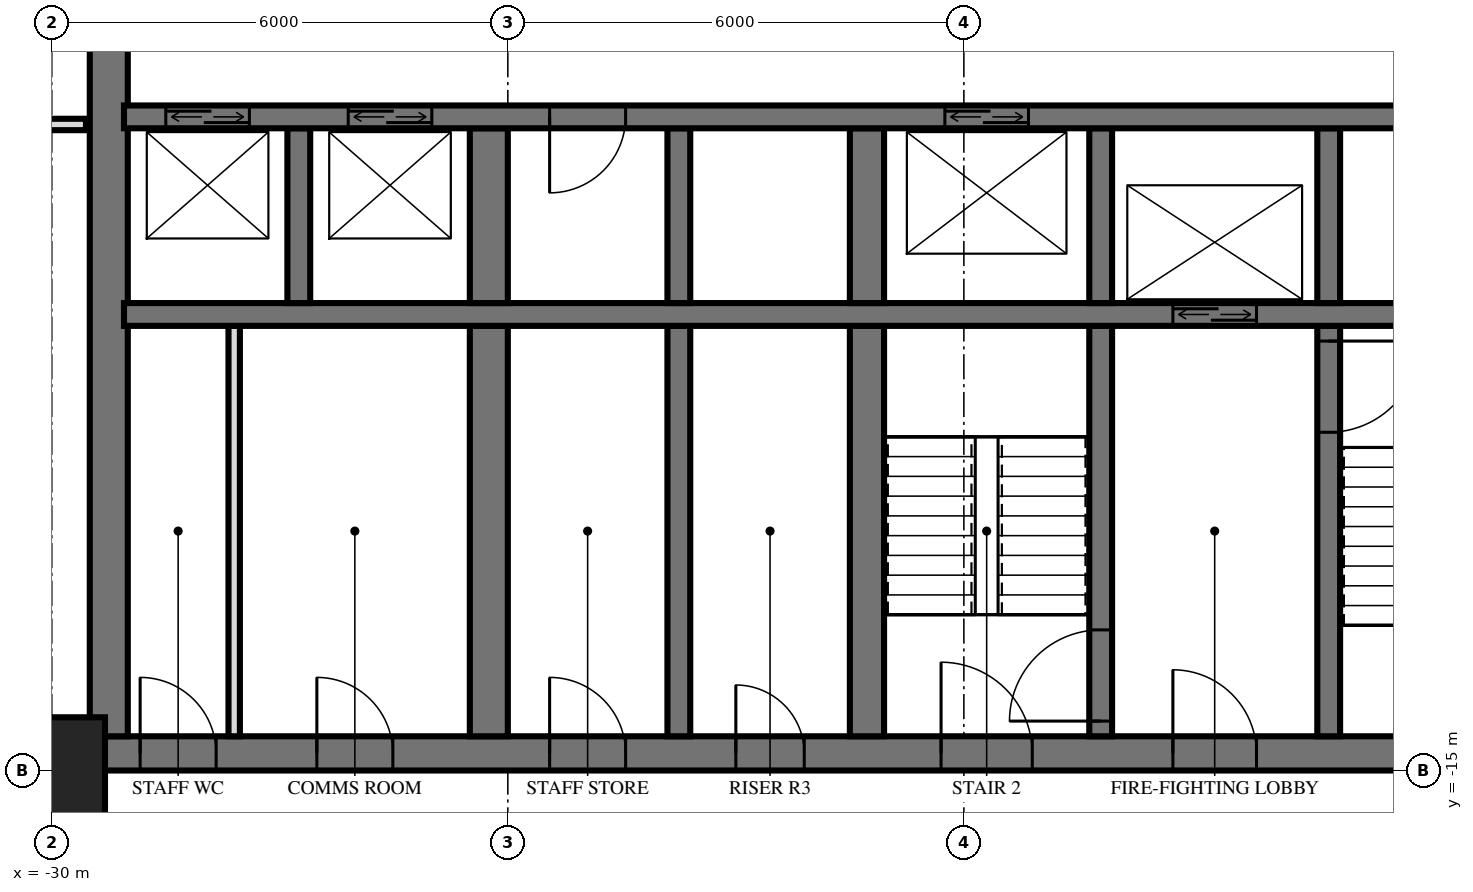
"""IFC4 building model, lengths in metres.
Left out: names, types, materials, properties, quantities, classifications, styles, units other than length and angle.
Written with IfcOpenShell. Run it as: python <this file> out.ifc"""

import sys

from ifc_helpers import new_model, si_unit, direction, frame, frame_2d, origin, origin_2d, place, context, subcontext, project, spatial, rectangle, extrude, element, fill, save


model = new_model("IFC4")
c1 = context("Model", 3, precision=1e-05, world=origin(), true_north=direction((0.0, 1.0)))
c2 = subcontext(c1, "Body", "Model", "MODEL_VIEW")
j1 = project(units=[si_unit("LENGTHUNIT", "METRE"), si_unit("PLANEANGLEUNIT", "RADIAN")], contexts=[c1])
p1 = place(None, origin())
s1 = spatial("IfcSite", under=j1, at=p1, CompositionType="ELEMENT")
p2 = place(p1, origin())
s2 = spatial("IfcBuilding", under=s1, at=p2, CompositionType="ELEMENT")
p3 = place(p2, frame((0.0, 0.0, 74.4)))
s3 = spatial("IfcBuildingStorey", under=s2, at=p3, CompositionType="ELEMENT", Elevation=74.4)
p4 = place(p3, frame((-30.0, -15.0, 0.0), z_axis=(0.0, 0.0, 1.0), x_axis=(1.0, 0.0, 0.0)))
e1 = element("IfcColumn", 1, at=p4, inside=s3, PredefinedType="COLUMN", context=c2, shape_type="SweptSolid", body=[
    extrude(rectangle(XDim=1.4, YDim=1.4, at=origin_2d()), origin(), (0.0, 0.0, 1.0), 3.6),
])
p5 = place(p3, frame((-29.5, -14.775, 0.0), z_axis=(0.0, 0.0, 1.0), x_axis=(1.0, 0.0, 0.0)))
e2 = element("IfcWall", 2, at=p5, inside=s3, PredefinedType="SHEAR", context=c2, shape_type="SweptSolid", body=[
    extrude(rectangle(XDim=19.5, YDim=0.45, at=frame_2d((9.75, 0.0))), origin(), (0.0, 0.0, 1.0), 3.6),
])
p6 = place(p5, frame((11.2, 0.0, 0.0)))
e3 = element("IfcOpeningElement", 3, at=p6, cuts=e2, PredefinedType="OPENING", context=c2, shape_type="SweptSolid", body=[
    extrude(rectangle(XDim=1.2, YDim=2.1, at=frame_2d((0.6, 1.05))), frame((0.0, 0.235, 0.0), z_axis=(0.0, -1.0, 0.0), x_axis=(1.0, 0.0, 0.0)), (0.0, 0.0, 1.0), 0.47),
])
p7 = place(p5, frame((14.25, 0.0, 0.0)))
e4 = element("IfcOpeningElement", 4, at=p7, cuts=e2, PredefinedType="OPENING", context=c2, shape_type="SweptSolid", body=[
    extrude(rectangle(XDim=1.1, YDim=2.1, at=frame_2d((0.55, 1.05))), frame((0.0, 0.235, 0.0), z_axis=(0.0, -1.0, 0.0), x_axis=(1.0, 0.0, 0.0)), (0.0, 0.0, 1.0), 0.47),
])
p8 = place(p5, frame((8.5, 0.0, 0.0)))
e5 = element("IfcOpeningElement", 5, at=p8, cuts=e2, PredefinedType="OPENING", context=c2, shape_type="SweptSolid", body=[
    extrude(rectangle(XDim=0.9, YDim=2.1, at=frame_2d((0.45, 1.05))), frame((0.0, 0.235, 0.0), z_axis=(0.0, -1.0, 0.0), x_axis=(1.0, 0.0, 0.0)), (0.0, 0.0, 1.0), 0.47),
])
p9 = place(p5, frame((6.05, 0.0, 0.0)))
e6 = element("IfcOpeningElement", 6, at=p9, cuts=e2, PredefinedType="OPENING", context=c2, shape_type="SweptSolid", body=[
    extrude(rectangle(XDim=1.0, YDim=2.1, at=frame_2d((0.5, 1.05))), frame((0.0, 0.235, 0.0), z_axis=(0.0, -1.0, 0.0), x_axis=(1.0, 0.0, 0.0)), (0.0, 0.0, 1.0), 0.47),
])
p10 = place(p5, frame((2.988, 0.0, 0.0)))
e7 = element("IfcOpeningElement", 7, at=p10, cuts=e2, PredefinedType="OPENING", context=c2, shape_type="SweptSolid", body=[
    extrude(rectangle(XDim=1.0, YDim=2.1, at=frame_2d((0.5, 1.05))), frame((0.0, 0.235, 0.0), z_axis=(0.0, -1.0, 0.0), x_axis=(1.0, 0.0, 0.0)), (0.0, 0.0, 1.0), 0.47),
])
p11 = place(p5, frame((0.663, 0.0, 0.0)))
e8 = element("IfcOpeningElement", 8, at=p11, cuts=e2, PredefinedType="OPENING", context=c2, shape_type="SweptSolid", body=[
    extrude(rectangle(XDim=1.0, YDim=2.1, at=frame_2d((0.5, 1.05))), frame((0.0, 0.235, 0.0), z_axis=(0.0, -1.0, 0.0), x_axis=(1.0, 0.0, 0.0)), (0.0, 0.0, 1.0), 0.47),
])
p12 = place(p3, frame((-29.25, -14.55, 0.0), z_axis=(0.0, 0.0, 1.0), x_axis=(0.0, 1.0, 0.0)))
e9 = element("IfcWall", 9, at=p12, inside=s3, PredefinedType="SHEAR", context=c2, shape_type="SweptSolid", body=[
    extrude(rectangle(XDim=14.1, YDim=0.5, at=frame_2d((7.05, 0.0))), origin(), (0.0, 0.0, 1.0), 3.6),
])
p13 = place(p3, frame((-29.05, -6.4, 0.0), z_axis=(0.0, 0.0, 1.0), x_axis=(1.0, 0.0, 0.0)))
e10 = element("IfcWall", 10, at=p13, inside=s3, PredefinedType="SHEAR", context=c2, shape_type="SweptSolid", body=[
    extrude(rectangle(XDim=18.7, YDim=0.3, at=frame_2d((9.35, 0.0))), origin(), (0.0, 0.0, 1.0), 3.6),
])
p14 = place(p13, frame((2.95, 0.0, 0.0)))
e11 = element("IfcOpeningElement", 11, at=p14, cuts=e10, PredefinedType="OPENING", context=c2, shape_type="SweptSolid", body=[
    extrude(rectangle(XDim=1.1, YDim=2.1, at=frame_2d((0.55, 1.05))), frame((0.0, 0.16, 0.0), z_axis=(0.0, -1.0, 0.0), x_axis=(1.0, 0.0, 0.0)), (0.0, 0.0, 1.0), 0.32),
])
p15 = place(p13, frame((0.55, 0.0, 0.0)))
e12 = element("IfcOpeningElement", 12, at=p15, cuts=e10, PredefinedType="OPENING", context=c2, shape_type="SweptSolid", body=[
    extrude(rectangle(XDim=1.1, YDim=2.1, at=frame_2d((0.55, 1.05))), frame((0.0, 0.16, 0.0), z_axis=(0.0, -1.0, 0.0), x_axis=(1.0, 0.0, 0.0)), (0.0, 0.0, 1.0), 0.32),
])
p16 = place(p13, frame((10.8, 0.0, 0.0)))
e13 = element("IfcOpeningElement", 13, at=p16, cuts=e10, PredefinedType="OPENING", context=c2, shape_type="SweptSolid", body=[
    extrude(rectangle(XDim=1.1, YDim=2.1, at=frame_2d((0.55, 1.05))), frame((0.0, 0.16, 0.0), z_axis=(0.0, -1.0, 0.0), x_axis=(1.0, 0.0, 0.0)), (0.0, 0.0, 1.0), 0.32),
])
p17 = place(p13, frame((5.6, 0.0, 0.0)))
e14 = element("IfcOpeningElement", 14, at=p17, cuts=e10, PredefinedType="OPENING", context=c2, shape_type="SweptSolid", body=[
    extrude(rectangle(XDim=1.0, YDim=2.1, at=frame_2d((0.5, 1.05))), frame((0.0, 0.16, 0.0), z_axis=(0.0, -1.0, 0.0), x_axis=(1.0, 0.0, 0.0)), (0.0, 0.0, 1.0), 0.32),
])
p18 = place(p3, frame((-29.05, -9.0, 0.0), z_axis=(0.0, 0.0, 1.0), x_axis=(1.0, 0.0, 0.0)))
e15 = element("IfcWall", 15, at=p18, inside=s3, PredefinedType="SHEAR", context=c2, shape_type="SweptSolid", body=[
    extrude(rectangle(XDim=18.7, YDim=0.3, at=frame_2d((9.35, 0.0))), origin(), (0.0, 0.0, 1.0), 3.6),
])
p19 = place(p18, frame((13.8, 0.0, 0.0)))
e16 = element("IfcOpeningElement", 16, at=p19, cuts=e15, PredefinedType="OPENING", context=c2, shape_type="SweptSolid", body=[
    extrude(rectangle(XDim=1.1, YDim=2.1, at=frame_2d((0.55, 1.05))), frame((0.0, 0.16, 0.0), z_axis=(0.0, -1.0, 0.0), x_axis=(1.0, 0.0, 0.0)), (0.0, 0.0, 1.0), 0.32),
])
p20 = place(p3, frame((-13.2, -8.85, 0.0), z_axis=(0.0, 0.0, 1.0), x_axis=(0.0, 1.0, 0.0)))
e17 = element("IfcWall", 17, at=p20, inside=s3, PredefinedType="SHEAR", context=c2, shape_type="SweptSolid", body=[
    extrude(rectangle(XDim=2.3, YDim=0.3, at=frame_2d((1.15, 0.0))), origin(), (0.0, 0.0, 1.0), 3.6),
])
p21 = place(p3, frame((-13.2, -14.55, 0.0), z_axis=(0.0, 0.0, 1.0), x_axis=(0.0, 1.0, 0.0)))
e18 = element("IfcWall", 18, at=p21, inside=s3, PredefinedType="SHEAR", context=c2, shape_type="SweptSolid", body=[
    extrude(rectangle(XDim=5.4, YDim=0.3, at=frame_2d((2.7, 0.0))), origin(), (0.0, 0.0, 1.0), 3.6),
])
p22 = place(p21, frame((4.0, 0.0, 0.0)))
e19 = element("IfcOpeningElement", 19, at=p22, cuts=e18, PredefinedType="OPENING", context=c2, shape_type="SweptSolid", body=[
    extrude(rectangle(XDim=1.2, YDim=2.1, at=frame_2d((0.6, 1.05))), frame((0.0, 0.16, 0.0), z_axis=(0.0, -1.0, 0.0), x_axis=(1.0, 0.0, 0.0)), (0.0, 0.0, 1.0), 0.32),
])
p23 = place(p3, frame((-16.2, -8.85, 0.0), z_axis=(0.0, 0.0, 1.0), x_axis=(0.0, 1.0, 0.0)))
e20 = element("IfcWall", 20, at=p23, inside=s3, PredefinedType="SHEAR", context=c2, shape_type="SweptSolid", body=[
    extrude(rectangle(XDim=2.3, YDim=0.3, at=frame_2d((1.15, 0.0))), origin(), (0.0, 0.0, 1.0), 3.6),
])
p24 = place(p3, frame((-16.2, -14.55, 0.0), z_axis=(0.0, 0.0, 1.0), x_axis=(0.0, 1.0, 0.0)))
e21 = element("IfcWall", 21, at=p24, inside=s3, PredefinedType="SHEAR", context=c2, shape_type="SweptSolid", body=[
    extrude(rectangle(XDim=5.4, YDim=0.3, at=frame_2d((2.7, 0.0))), origin(), (0.0, 0.0, 1.0), 3.6),
])
p25 = place(p24, frame((0.2, 0.0, 0.0)))
e22 = element("IfcOpeningElement", 22, at=p25, cuts=e21, PredefinedType="OPENING", context=c2, shape_type="SweptSolid", body=[
    extrude(rectangle(XDim=1.2, YDim=2.1, at=frame_2d((0.6, 1.05))), frame((0.0, 0.16, 0.0), z_axis=(0.0, -1.0, 0.0), x_axis=(1.0, 0.0, 0.0)), (0.0, 0.0, 1.0), 0.32),
])
p26 = place(p3, frame((-19.275, -8.85, 0.0), z_axis=(0.0, 0.0, 1.0), x_axis=(0.0, 1.0, 0.0)))
e23 = element("IfcWall", 23, at=p26, inside=s3, PredefinedType="SHEAR", context=c2, shape_type="SweptSolid", body=[
    extrude(rectangle(XDim=2.3, YDim=0.45, at=frame_2d((1.15, 0.0))), origin(), (0.0, 0.0, 1.0), 3.6),
])
p27 = place(p3, frame((-19.275, -14.55, 0.0), z_axis=(0.0, 0.0, 1.0), x_axis=(0.0, 1.0, 0.0)))
e24 = element("IfcWall", 24, at=p27, inside=s3, PredefinedType="SHEAR", context=c2, shape_type="SweptSolid", body=[
    extrude(rectangle(XDim=5.4, YDim=0.45, at=frame_2d((2.7, 0.0))), origin(), (0.0, 0.0, 1.0), 3.6),
])
p28 = place(p3, frame((-21.75, -8.85, 0.0), z_axis=(0.0, 0.0, 1.0), x_axis=(0.0, 1.0, 0.0)))
e25 = element("IfcWall", 25, at=p28, inside=s3, PredefinedType="SHEAR", context=c2, shape_type="SweptSolid", body=[
    extrude(rectangle(XDim=2.3, YDim=0.3, at=frame_2d((1.15, 0.0))), origin(), (0.0, 0.0, 1.0), 3.6),
])
p29 = place(p3, frame((-21.75, -14.55, 0.0), z_axis=(0.0, 0.0, 1.0), x_axis=(0.0, 1.0, 0.0)))
e26 = element("IfcWall", 26, at=p29, inside=s3, PredefinedType="SHEAR", context=c2, shape_type="SweptSolid", body=[
    extrude(rectangle(XDim=5.4, YDim=0.3, at=frame_2d((2.7, 0.0))), origin(), (0.0, 0.0, 1.0), 3.6),
])
p30 = place(p3, frame((-24.25, -8.85, 0.0), z_axis=(0.0, 0.0, 1.0), x_axis=(0.0, 1.0, 0.0)))
e27 = element("IfcWall", 27, at=p30, inside=s3, PredefinedType="SHEAR", context=c2, shape_type="SweptSolid", body=[
    extrude(rectangle(XDim=2.3, YDim=0.5, at=frame_2d((1.15, 0.0))), origin(), (0.0, 0.0, 1.0), 3.6),
])
p31 = place(p3, frame((-24.25, -14.55, 0.0), z_axis=(0.0, 0.0, 1.0), x_axis=(0.0, 1.0, 0.0)))
e28 = element("IfcWall", 28, at=p31, inside=s3, PredefinedType="SHEAR", context=c2, shape_type="SweptSolid", body=[
    extrude(rectangle(XDim=5.4, YDim=0.5, at=frame_2d((2.7, 0.0))), origin(), (0.0, 0.0, 1.0), 3.6),
])
p32 = place(p3, frame((-26.75, -8.85, 0.0), z_axis=(0.0, 0.0, 1.0), x_axis=(0.0, 1.0, 0.0)))
e29 = element("IfcWall", 29, at=p32, inside=s3, PredefinedType="SHEAR", context=c2, shape_type="SweptSolid", body=[
    extrude(rectangle(XDim=2.3, YDim=0.3, at=frame_2d((1.15, 0.0))), origin(), (0.0, 0.0, 1.0), 3.6),
])
p33 = place(p3, frame((-27.6, -14.55, 0.0), z_axis=(0.0, 0.0, 1.0), x_axis=(0.0, 1.0, 0.0)))
e30 = element("IfcWall", 30, at=p33, inside=s3, PredefinedType="PARTITIONING", context=c2, shape_type="SweptSolid", body=[
    extrude(rectangle(XDim=5.4, YDim=0.15, at=frame_2d((2.7, 0.0))), origin(), (0.0, 0.0, 1.0), 3.3),
])
p34 = place(p3, frame((-33.12, -15.0, 0.0), z_axis=(0.0, 0.0, 1.0), x_axis=(1.0, 0.0, 0.0)))
e31 = element("IfcWall", 31, at=p34, inside=s3, PredefinedType="PARTITIONING", context=c2, shape_type="SweptSolid", body=[
    extrude(rectangle(XDim=3.57, YDim=0.15, at=frame_2d((1.785, 0.0))), origin(), (0.0, 0.0, 1.0), 3.32),
])
p35 = place(p34, frame((1.58, 0.0, 0.0)))
e32 = element("IfcOpeningElement", 32, at=p35, cuts=e31, PredefinedType="OPENING", context=c2, shape_type="SweptSolid", body=[
    extrude(rectangle(XDim=0.8, YDim=2.1, at=frame_2d((0.4, 1.05))), frame((0.0, 0.085, 0.0), z_axis=(0.0, -1.0, 0.0), x_axis=(1.0, 0.0, 0.0)), (0.0, 0.0, 1.0), 0.17),
])
p36 = place(p3, frame((-33.12, -6.5, 0.0), z_axis=(0.0, 0.0, 1.0), x_axis=(1.0, 0.0, 0.0)))
e33 = element("IfcWall", 33, at=p36, inside=s3, PredefinedType="PARTITIONING", context=c2, shape_type="SweptSolid", body=[
    extrude(rectangle(XDim=3.57, YDim=0.15, at=frame_2d((1.785, 0.0))), origin(), (0.0, 0.0, 1.0), 3.32),
])
p37 = place(p36, frame((1.27, 0.0, 0.0)))
e34 = element("IfcOpeningElement", 34, at=p37, cuts=e33, PredefinedType="OPENING", context=c2, shape_type="SweptSolid", body=[
    extrude(rectangle(XDim=0.9, YDim=2.1, at=frame_2d((0.45, 1.05))), frame((0.0, 0.085, 0.0), z_axis=(0.0, -1.0, 0.0), x_axis=(1.0, 0.0, 0.0)), (0.0, 0.0, 1.0), 0.17),
])
p38 = place(p14, origin())
e35 = element("IfcDoor", 35, at=p38, inside=s3, OperationType="DOUBLE_DOOR_SLIDING", PredefinedType="USERDEFINED", context=c2, shape_type="SweptSolid", body=[
    extrude(rectangle(XDim=1.1, YDim=2.1, at=frame_2d((0.55, 1.05))), frame((0.0, 0.025, 0.0), z_axis=(0.0, -1.0, 0.0), x_axis=(1.0, 0.0, 0.0)), (0.0, 0.0, 1.0), 0.05),
])
fill(e11, e35)
p39 = place(p15, origin())
e36 = element("IfcDoor", 36, at=p39, inside=s3, OperationType="DOUBLE_DOOR_SLIDING", PredefinedType="USERDEFINED", context=c2, shape_type="SweptSolid", body=[
    extrude(rectangle(XDim=1.1, YDim=2.1, at=frame_2d((0.55, 1.05))), frame((0.0, 0.025, 0.0), z_axis=(0.0, -1.0, 0.0), x_axis=(1.0, 0.0, 0.0)), (0.0, 0.0, 1.0), 0.05),
])
fill(e12, e36)
p40 = place(p19, origin())
e37 = element("IfcDoor", 37, at=p40, inside=s3, OperationType="DOUBLE_DOOR_SLIDING", PredefinedType="USERDEFINED", context=c2, shape_type="SweptSolid", body=[
    extrude(rectangle(XDim=1.1, YDim=2.1, at=frame_2d((0.55, 1.05))), frame((0.0, 0.025, 0.0), z_axis=(0.0, -1.0, 0.0), x_axis=(1.0, 0.0, 0.0)), (0.0, 0.0, 1.0), 0.05),
])
fill(e16, e37)
p41 = place(p16, origin())
e38 = element("IfcDoor", 38, at=p41, inside=s3, OperationType="DOUBLE_DOOR_SLIDING", PredefinedType="USERDEFINED", context=c2, shape_type="SweptSolid", body=[
    extrude(rectangle(XDim=1.1, YDim=2.1, at=frame_2d((0.55, 1.05))), frame((0.0, 0.025, 0.0), z_axis=(0.0, -1.0, 0.0), x_axis=(1.0, 0.0, 0.0)), (0.0, 0.0, 1.0), 0.05),
])
fill(e13, e38)
p42 = place(p6, origin())
e39 = element("IfcDoor", 39, at=p42, inside=s3, OperationType="SINGLE_SWING_RIGHT", PredefinedType="DOOR", context=c2, shape_type="SweptSolid", body=[
    extrude(rectangle(XDim=1.2, YDim=2.1, at=frame_2d((0.6, 1.05))), frame((0.0, 0.025, 0.0), z_axis=(0.0, -1.0, 0.0), x_axis=(1.0, 0.0, 0.0)), (0.0, 0.0, 1.0), 0.05),
])
fill(e3, e39)
p43 = place(p7, origin())
e40 = element("IfcDoor", 40, at=p43, inside=s3, OperationType="SINGLE_SWING_RIGHT", PredefinedType="DOOR", context=c2, shape_type="SweptSolid", body=[
    extrude(rectangle(XDim=1.1, YDim=2.1, at=frame_2d((0.55, 1.05))), frame((0.0, 0.025, 0.0), z_axis=(0.0, -1.0, 0.0), x_axis=(1.0, 0.0, 0.0)), (0.0, 0.0, 1.0), 0.05),
])
fill(e4, e40)
p44 = place(p8, origin())
e41 = element("IfcDoor", 41, at=p44, inside=s3, OperationType="SINGLE_SWING_RIGHT", PredefinedType="DOOR", context=c2, shape_type="SweptSolid", body=[
    extrude(rectangle(XDim=0.9, YDim=2.1, at=frame_2d((0.45, 1.05))), frame((0.0, 0.025, 0.0), z_axis=(0.0, -1.0, 0.0), x_axis=(1.0, 0.0, 0.0)), (0.0, 0.0, 1.0), 0.05),
])
fill(e5, e41)
p45 = place(p9, origin())
e42 = element("IfcDoor", 42, at=p45, inside=s3, OperationType="SINGLE_SWING_RIGHT", PredefinedType="DOOR", context=c2, shape_type="SweptSolid", body=[
    extrude(rectangle(XDim=1.0, YDim=2.1, at=frame_2d((0.5, 1.05))), frame((0.0, 0.025, 0.0), z_axis=(0.0, -1.0, 0.0), x_axis=(1.0, 0.0, 0.0)), (0.0, 0.0, 1.0), 0.05),
])
fill(e6, e42)
p46 = place(p10, origin())
e43 = element("IfcDoor", 43, at=p46, inside=s3, OperationType="SINGLE_SWING_RIGHT", PredefinedType="DOOR", context=c2, shape_type="SweptSolid", body=[
    extrude(rectangle(XDim=1.0, YDim=2.1, at=frame_2d((0.5, 1.05))), frame((0.0, 0.025, 0.0), z_axis=(0.0, -1.0, 0.0), x_axis=(1.0, 0.0, 0.0)), (0.0, 0.0, 1.0), 0.05),
])
fill(e7, e43)
p47 = place(p11, origin())
e44 = element("IfcDoor", 44, at=p47, inside=s3, OperationType="SINGLE_SWING_RIGHT", PredefinedType="DOOR", context=c2, shape_type="SweptSolid", body=[
    extrude(rectangle(XDim=1.0, YDim=2.1, at=frame_2d((0.5, 1.05))), frame((0.0, 0.025, 0.0), z_axis=(0.0, -1.0, 0.0), x_axis=(1.0, 0.0, 0.0)), (0.0, 0.0, 1.0), 0.05),
])
fill(e8, e44)
p48 = place(p17, frame((0.5, 0.0, 0.0), z_axis=(0.0, 0.0, 1.0), x_axis=(-1.0, 0.0, 0.0)))
e45 = element("IfcDoor", 45, at=p48, inside=s3, OperationType="SINGLE_SWING_LEFT", PredefinedType="DOOR", context=c2, shape_type="SweptSolid", body=[
    extrude(rectangle(XDim=1.0, YDim=2.1, at=frame_2d((0.0, 1.05))), frame((0.0, -0.025, 0.0), z_axis=(0.0, 1.0, 0.0), x_axis=(-1.0, 0.0, 0.0)), (0.0, 0.0, 1.0), 0.05),
])
fill(e14, e45)
p49 = place(p22, frame((0.6, 0.0, 0.0), z_axis=(0.0, 0.0, 1.0), x_axis=(-1.0, 0.0, 0.0)))
e46 = element("IfcDoor", 46, at=p49, inside=s3, OperationType="SINGLE_SWING_RIGHT", PredefinedType="DOOR", context=c2, shape_type="SweptSolid", body=[
    extrude(rectangle(XDim=1.2, YDim=2.1, at=frame_2d((0.0, 1.05))), frame((0.0, -0.025, 0.0), z_axis=(0.0, 1.0, 0.0), x_axis=(-1.0, 0.0, 0.0)), (0.0, 0.0, 1.0), 0.05),
])
fill(e19, e46)
p50 = place(p25, origin())
e47 = element("IfcDoor", 47, at=p50, inside=s3, OperationType="SINGLE_SWING_RIGHT", PredefinedType="DOOR", context=c2, shape_type="SweptSolid", body=[
    extrude(rectangle(XDim=1.2, YDim=2.1, at=frame_2d((0.6, 1.05))), frame((0.0, 0.025, 0.0), z_axis=(0.0, -1.0, 0.0), x_axis=(1.0, 0.0, 0.0)), (0.0, 0.0, 1.0), 0.05),
])
fill(e22, e47)
save(model, sys.argv[1])
